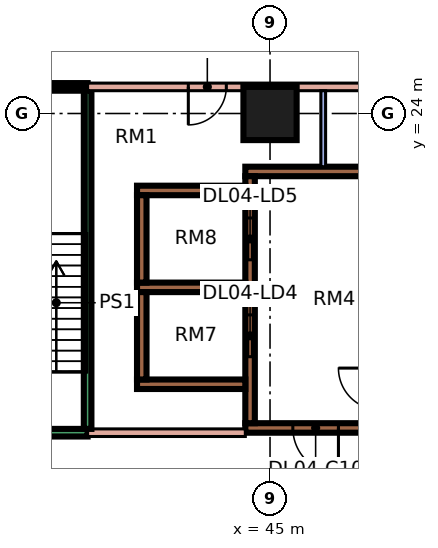
"""IFC4 building model, lengths in metres.
Left out: names, types, materials, properties, quantities, classifications, styles, units other than length and angle.
Written with IfcOpenShell. Run it as: python <this file> out.ifc"""

import sys

from ifc_helpers import new_model, si_unit, direction, frame, frame_2d, origin, origin_2d, place, context, subcontext, project, spatial, rectangle, extrude, element, fill, save


model = new_model("IFC4")
c1 = context("Model", 3, precision=1e-05, world=origin(), true_north=direction((0.0, 1.0)))
c2 = subcontext(c1, "Body", "Model", "MODEL_VIEW")
j1 = project(units=[si_unit("LENGTHUNIT", "METRE"), si_unit("PLANEANGLEUNIT", "RADIAN")], contexts=[c1])
p1 = place(None, origin())
s1 = spatial("IfcSite", under=j1, at=p1, CompositionType="ELEMENT")
p2 = place(p1, origin())
s2 = spatial("IfcBuilding", under=s1, at=p2, CompositionType="ELEMENT")
p3 = place(p2, frame((0.0, 0.0, 21.6)))
s3 = spatial("IfcBuildingStorey", under=s2, at=p3, CompositionType="ELEMENT", Elevation=21.6)
p4 = place(p3, frame((45.0, 24.0, 0.0), z_axis=(0.0, 0.0, 1.0), x_axis=(1.0, 0.0, 0.0)))
e1 = element("IfcColumn", 1, at=p4, inside=s3, PredefinedType="COLUMN", context=c2, shape_type="SweptSolid", body=[
    extrude(rectangle(XDim=1.4, YDim=1.4, at=origin_2d()), origin(), (0.0, 0.0, 1.0), 4.8),
])
p5 = place(p3, frame((44.35, 15.725, 0.0), z_axis=(0.0, 0.0, 1.0), x_axis=(1.0, 0.0, 0.0)))
e2 = element("IfcWall", 2, at=p5, inside=s3, PredefinedType="SHEAR", context=c2, shape_type="SweptSolid", body=[
    extrude(rectangle(XDim=3.425, YDim=0.25, at=frame_2d((1.712, 0.0))), origin(), (0.0, 0.0, 1.0), 4.8),
])
p6 = place(p5, frame((1.25, 0.0, 0.0)))
e3 = element("IfcOpeningElement", 3, at=p6, cuts=e2, PredefinedType="OPENING", context=c2, shape_type="SweptSolid", body=[
    extrude(rectangle(XDim=1.2, YDim=2.2, at=frame_2d((0.6, 1.1))), frame((0.0, 0.135, 0.0), z_axis=(0.0, -1.0, 0.0), x_axis=(1.0, 0.0, 0.0)), (0.0, 0.0, 1.0), 0.27),
])
p7 = place(p3, frame((44.35, 22.475, 0.0), z_axis=(0.0, 0.0, 1.0), x_axis=(1.0, 0.0, 0.0)))
e4 = element("IfcWall", 4, at=p7, inside=s3, PredefinedType="SHEAR", context=c2, shape_type="SweptSolid", body=[
    extrude(rectangle(XDim=3.425, YDim=0.25, at=frame_2d((1.712, 0.0))), origin(), (0.0, 0.0, 1.0), 4.8),
])
p8 = place(p3, frame((44.475, 15.85, 0.0), z_axis=(0.0, 0.0, 1.0), x_axis=(0.0, 1.0, 0.0)))
e5 = element("IfcWall", 5, at=p8, inside=s3, PredefinedType="SHEAR", context=c2, shape_type="SweptSolid", body=[
    extrude(rectangle(XDim=6.5, YDim=0.25, at=frame_2d((3.25, 0.0))), origin(), (0.0, 0.0, 1.0), 4.8),
])
p9 = place(p8, frame((1.75, 0.0, 0.0)))
e6 = element("IfcOpeningElement", 6, at=p9, cuts=e5, PredefinedType="OPENING", context=c2, shape_type="SweptSolid", body=[
    extrude(rectangle(XDim=1.1, YDim=2.2, at=frame_2d((0.55, 1.1))), frame((0.0, 0.135, 0.0), z_axis=(0.0, -1.0, 0.0), x_axis=(1.0, 0.0, 0.0)), (0.0, 0.0, 1.0), 0.27),
])
p10 = place(p8, frame((4.3, 0.0, 0.0)))
e7 = element("IfcOpeningElement", 7, at=p10, cuts=e5, PredefinedType="OPENING", context=c2, shape_type="SweptSolid", body=[
    extrude(rectangle(XDim=1.1, YDim=2.2, at=frame_2d((0.55, 1.1))), frame((0.0, 0.135, 0.0), z_axis=(0.0, -1.0, 0.0), x_axis=(1.0, 0.0, 0.0)), (0.0, 0.0, 1.0), 0.27),
])
for number, where, z_axis, x_axis in (
    (8, (41.5, 16.875, 0.0), (0.0, 0.0, 1.0), (1.0, 0.0, 0.0)),
    (9, (41.5, 19.425, 0.0), (0.0, 0.0, 1.0), (1.0, 0.0, 0.0)),
    (10, (41.5, 21.975, 0.0), (0.0, 0.0, 1.0), (1.0, 0.0, 0.0)),
):
    element("IfcWall", number, at=place(p3, frame(where, z_axis=z_axis, x_axis=x_axis)), inside=s3, PredefinedType="SHEAR", context=c2, shape_type="SweptSolid", body=[
        extrude(rectangle(XDim=2.85, YDim=0.25, at=frame_2d((1.425, 0.0))), origin(), (0.0, 0.0, 1.0), 4.8),
    ])
for number, where, z_axis, x_axis in (
    (11, (41.625, 17.0, 0.0), (0.0, 0.0, 1.0), (0.0, 1.0, 0.0)),
    (12, (41.625, 19.55, 0.0), (0.0, 0.0, 1.0), (0.0, 1.0, 0.0)),
):
    element("IfcWall", number, at=place(p3, frame(where, z_axis=z_axis, x_axis=x_axis)), inside=s3, PredefinedType="SHEAR", context=c2, shape_type="SweptSolid", body=[
        extrude(rectangle(XDim=2.3, YDim=0.25, at=frame_2d((1.15, 0.0))), origin(), (0.0, 0.0, 1.0), 4.8),
    ])
p11 = place(p3, frame((34.0, 15.6, 0.0), z_axis=(0.0, 0.0, 1.0), x_axis=(1.0, 0.0, 0.0)))
e13 = element("IfcWall", 13, at=p11, inside=s3, PredefinedType="SOLIDWALL", context=c2, shape_type="SweptSolid", body=[
    extrude(rectangle(XDim=6.2, YDim=0.2, at=frame_2d((3.1, 0.0))), origin(), (0.0, 0.0, 1.0), 4.4),
])
p12 = place(p3, frame((36.0, 24.7, 0.0), z_axis=(0.0, 0.0, 1.0), x_axis=(1.0, 0.0, 0.0)))
e14 = element("IfcWall", 14, at=p12, inside=s3, PredefinedType="SOLIDWALL", context=c2, shape_type="SweptSolid", body=[
    extrude(rectangle(XDim=4.2, YDim=0.2, at=frame_2d((2.1, 0.0))), origin(), (0.0, 0.0, 1.0), 4.4),
])
p13 = place(p3, frame((40.2, 15.6, 0.0), z_axis=(0.0, 0.0, 1.0), x_axis=(1.0, 0.0, 0.0)))
e15 = element("IfcWall", 15, at=p13, inside=s3, PredefinedType="PARTITIONING", context=c2, shape_type="SweptSolid", body=[
    extrude(rectangle(XDim=4.15, YDim=0.2, at=frame_2d((2.075, 0.0))), origin(), (0.0, 0.0, 1.0), 4.4),
])
p14 = place(p3, frame((40.2, 15.7, 0.0), z_axis=(0.0, 0.0, 1.0), x_axis=(0.0, 1.0, 0.0)))
e16 = element("IfcWall", 16, at=p14, inside=s3, PredefinedType="SOLIDWALL", context=c2, shape_type="SweptSolid", body=[
    extrude(rectangle(XDim=8.9, YDim=0.2, at=frame_2d((4.45, 0.0))), origin(), (0.0, 0.0, 1.0), 4.4),
])
p15 = place(p3, frame((40.2, 24.7, 0.0), z_axis=(0.0, 0.0, 1.0), x_axis=(1.0, 0.0, 0.0)))
e17 = element("IfcWall", 17, at=p15, inside=s3, PredefinedType="PARTITIONING", context=c2, shape_type="SweptSolid", body=[
    extrude(rectangle(XDim=32.6, YDim=0.2, at=frame_2d((16.3, 0.0))), origin(), (0.0, 0.0, 1.0), 4.4),
])
p16 = place(p15, frame((2.65, 0.0, 0.0)))
e18 = element("IfcOpeningElement", 18, at=p16, cuts=e17, PredefinedType="OPENING", context=c2, shape_type="SweptSolid", body=[
    extrude(rectangle(XDim=1.0, YDim=2.1, at=frame_2d((0.5, 1.05))), frame((0.0, 0.11, 0.0), z_axis=(0.0, -1.0, 0.0), x_axis=(1.0, 0.0, 0.0)), (0.0, 0.0, 1.0), 0.22),
])
p17 = place(p15, frame((8.85, 0.0, 0.0)))
e19 = element("IfcOpeningElement", 19, at=p17, cuts=e17, PredefinedType="OPENING", context=c2, shape_type="SweptSolid", body=[
    extrude(rectangle(XDim=1.0, YDim=2.1, at=frame_2d((0.5, 1.05))), frame((0.0, 0.11, 0.0), z_axis=(0.0, -1.0, 0.0), x_axis=(1.0, 0.0, 0.0)), (0.0, 0.0, 1.0), 0.22),
])
p18 = place(p15, frame((15.05, 0.0, 0.0)))
e20 = element("IfcOpeningElement", 20, at=p18, cuts=e17, PredefinedType="OPENING", context=c2, shape_type="SweptSolid", body=[
    extrude(rectangle(XDim=1.0, YDim=2.1, at=frame_2d((0.5, 1.05))), frame((0.0, 0.11, 0.0), z_axis=(0.0, -1.0, 0.0), x_axis=(1.0, 0.0, 0.0)), (0.0, 0.0, 1.0), 0.22),
])
p19 = place(p15, frame((21.0, 0.0, 0.0)))
e21 = element("IfcOpeningElement", 21, at=p19, cuts=e17, PredefinedType="OPENING", context=c2, shape_type="SweptSolid", body=[
    extrude(rectangle(XDim=1.0, YDim=2.1, at=frame_2d((0.5, 1.05))), frame((0.0, 0.11, 0.0), z_axis=(0.0, -1.0, 0.0), x_axis=(1.0, 0.0, 0.0)), (0.0, 0.0, 1.0), 0.22),
])
p20 = place(p3, frame((46.4, 22.6, 0.0), z_axis=(0.0, 0.0, 1.0), x_axis=(0.0, 1.0, 0.0)))
e22 = element("IfcWall", 22, at=p20, inside=s3, PredefinedType="PARTITIONING", context=c2, shape_type="SweptSolid", body=[
    extrude(rectangle(XDim=2.0, YDim=0.125, at=frame_2d((1.0, 0.0))), origin(), (0.0, 0.0, 1.0), 4.4),
])
p21 = place(p6, origin())
e23 = element("IfcDoor", 23, at=p21, inside=s3, OperationType="SINGLE_SWING_RIGHT", PredefinedType="DOOR", context=c2, shape_type="SweptSolid", body=[
    extrude(rectangle(XDim=1.2, YDim=2.2, at=frame_2d((0.6, 1.1))), frame((0.0, 0.025, 0.0), z_axis=(0.0, -1.0, 0.0), x_axis=(1.0, 0.0, 0.0)), (0.0, 0.0, 1.0), 0.05),
])
fill(e3, e23)
p22 = place(p9, origin())
e24 = element("IfcDoor", 24, at=p22, inside=s3, OperationType="DOUBLE_DOOR_SLIDING", PredefinedType="DOOR", context=c2, shape_type="SweptSolid", body=[
    extrude(rectangle(XDim=1.1, YDim=2.2, at=frame_2d((0.55, 1.1))), frame((0.0, 0.025, 0.0), z_axis=(0.0, -1.0, 0.0), x_axis=(1.0, 0.0, 0.0)), (0.0, 0.0, 1.0), 0.05),
])
fill(e6, e24)
p23 = place(p10, origin())
e25 = element("IfcDoor", 25, at=p23, inside=s3, OperationType="DOUBLE_DOOR_SLIDING", PredefinedType="DOOR", context=c2, shape_type="SweptSolid", body=[
    extrude(rectangle(XDim=1.1, YDim=2.2, at=frame_2d((0.55, 1.1))), frame((0.0, 0.025, 0.0), z_axis=(0.0, -1.0, 0.0), x_axis=(1.0, 0.0, 0.0)), (0.0, 0.0, 1.0), 0.05),
])
fill(e7, e25)
p24 = place(p16, frame((1.0, 0.0, 0.0), z_axis=(0.0, 0.0, 1.0), x_axis=(-1.0, 0.0, 0.0)))
e26 = element("IfcDoor", 26, at=p24, inside=s3, OperationType="SINGLE_SWING_LEFT", PredefinedType="DOOR", context=c2, shape_type="SweptSolid", body=[
    extrude(rectangle(XDim=1.0, YDim=2.1, at=frame_2d((0.5, 1.05))), frame((0.0, 0.025, 0.0), z_axis=(0.0, -1.0, 0.0), x_axis=(1.0, 0.0, 0.0)), (0.0, 0.0, 1.0), 0.05),
])
fill(e18, e26)
save(model, sys.argv[1])
